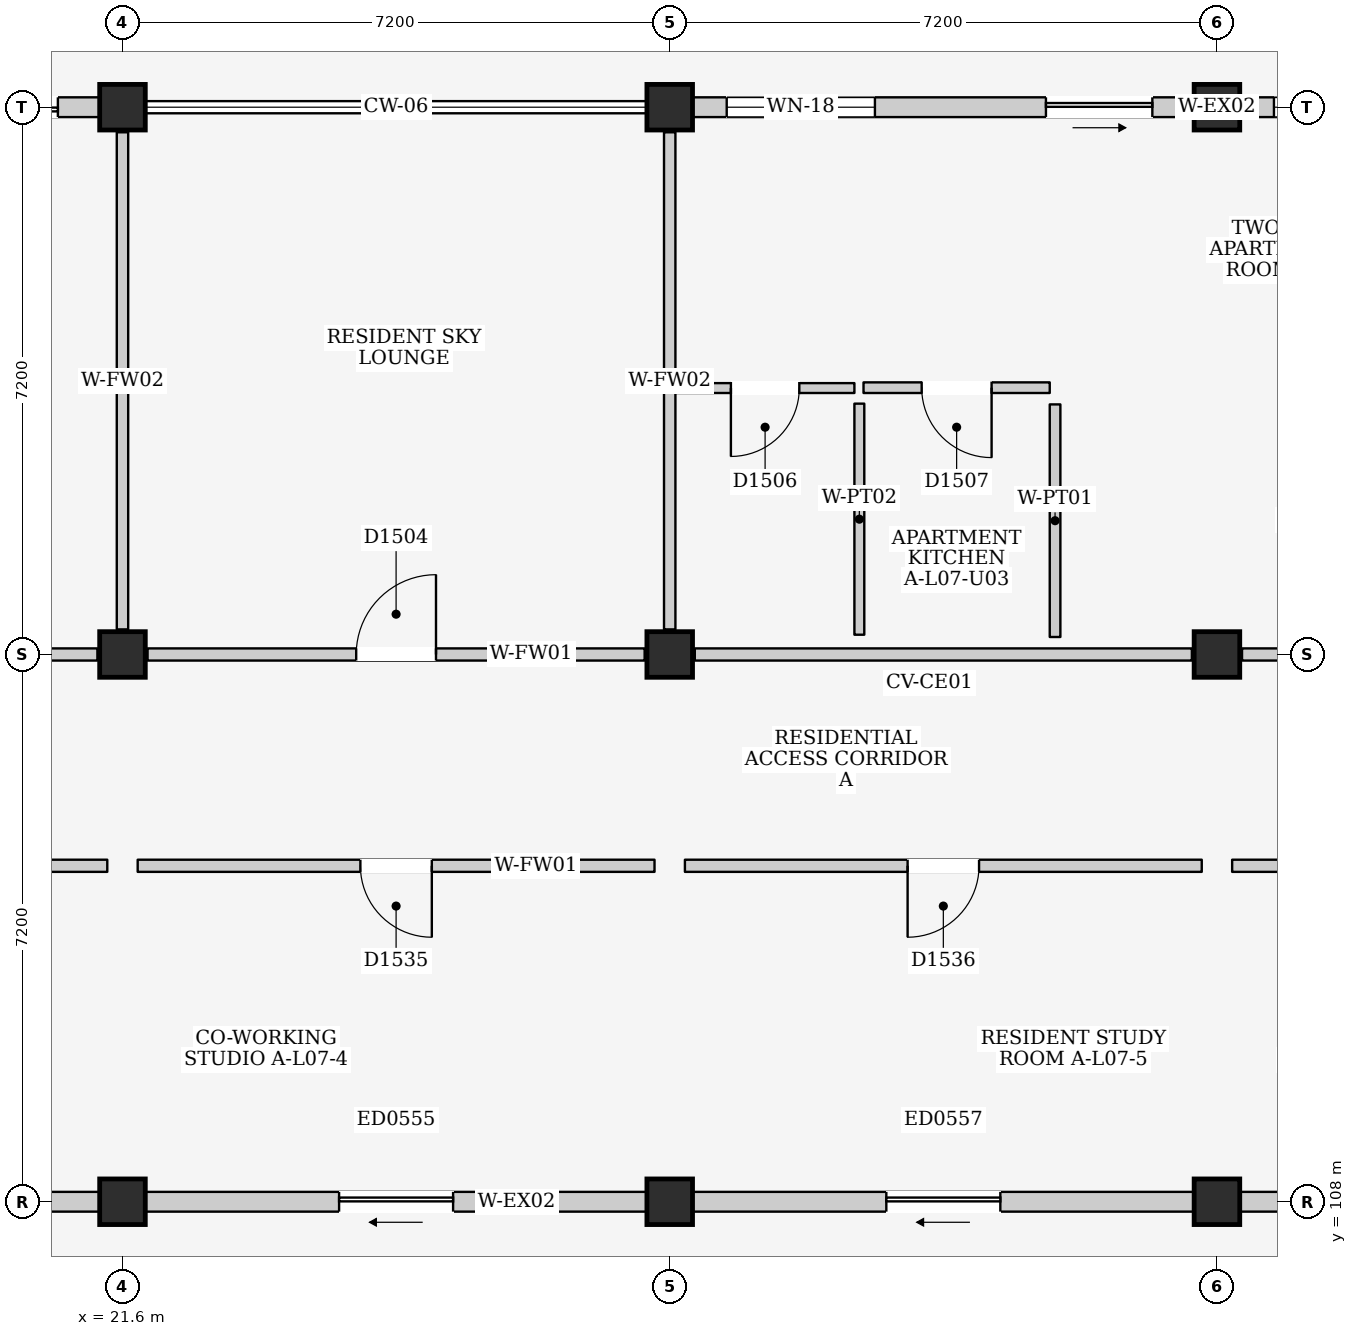
"""IFC4 building model, lengths in metres.
Left out: names, types, materials, properties, quantities, classifications, styles, units other than length and angle.
Written with IfcOpenShell. Run it as: python <this file> out.ifc"""

import sys

from ifc_helpers import new_model, si_unit, direction, frame, frame_2d, origin, origin_2d, place, context, subcontext, project, spatial, rectangle, extrude, element, fill, save


model = new_model("IFC4")
c1 = context("Model", 3, precision=1e-05, world=origin(), true_north=direction((0.0, 1.0)))
c2 = subcontext(c1, "Body", "Model", "MODEL_VIEW")
j1 = project(units=[si_unit("LENGTHUNIT", "METRE"), si_unit("PLANEANGLEUNIT", "RADIAN")], contexts=[c1])
p1 = place(None, origin())
s1 = spatial("IfcSite", under=j1, at=p1, CompositionType="ELEMENT")
p2 = place(p1, origin())
s2 = spatial("IfcBuilding", under=s1, at=p2, CompositionType="ELEMENT")
p3 = place(p2, frame((0.0, 0.0, 25.1)))
s3 = spatial("IfcBuildingStorey", under=s2, at=p3, CompositionType="ELEMENT", Elevation=25.1)
for number, where, z_axis, x_axis in (
    (1, (21.6, 108.0, 0.0), (0.0, 0.0, 1.0), (1.0, 0.0, 0.0)),
    (2, (21.6, 115.2, 0.0), (0.0, 0.0, 1.0), (1.0, 0.0, 0.0)),
    (3, (21.6, 122.4, 0.0), (0.0, 0.0, 1.0), (1.0, 0.0, 0.0)),
    (4, (28.8, 108.0, 0.0), (0.0, 0.0, 1.0), (1.0, 0.0, 0.0)),
    (5, (28.8, 115.2, 0.0), (0.0, 0.0, 1.0), (1.0, 0.0, 0.0)),
    (6, (28.8, 122.4, 0.0), (0.0, 0.0, 1.0), (1.0, 0.0, 0.0)),
    (7, (36.0, 108.0, 0.0), (0.0, 0.0, 1.0), (1.0, 0.0, 0.0)),
    (8, (36.0, 115.2, 0.0), (0.0, 0.0, 1.0), (1.0, 0.0, 0.0)),
    (9, (36.0, 122.4, 0.0), (0.0, 0.0, 1.0), (1.0, 0.0, 0.0)),
):
    element("IfcColumn", number, at=place(p3, frame(where, z_axis=z_axis, x_axis=x_axis)), inside=s3, PredefinedType="COLUMN", context=c2, shape_type="SweptSolid", body=[
        extrude(rectangle(XDim=0.6, YDim=0.6, at=origin_2d()), origin(), (0.0, 0.0, 1.0), 3.2),
    ])
p4 = place(p3, frame((14.7, 122.4, 0.0), z_axis=(0.0, 0.0, 1.0), x_axis=(1.0, 0.0, 0.0)))
e10 = element("IfcWall", 10, at=p4, inside=s3, PredefinedType="ELEMENTEDWALL", context=c2, shape_type="SweptSolid", body=[
    extrude(rectangle(XDim=6.6, YDim=0.26, at=frame_2d((3.3, 0.0))), origin(), (0.0, 0.0, 1.0), 2.525),
])
p5 = place(p4, frame((3.65, 0.0, 0.0)))
e11 = element("IfcOpeningElement", 11, at=p5, cuts=e10, PredefinedType="OPENING", context=c2, shape_type="SweptSolid", body=[
    extrude(rectangle(XDim=2.4, YDim=2.12, at=frame_2d((1.2, 1.06))), frame((0.0, 0.145, 0.0), z_axis=(0.0, -1.0, 0.0), x_axis=(1.0, 0.0, 0.0)), (0.0, 0.0, 1.0), 0.29),
])
p6 = place(p4, frame((0.45, 0.0, 0.9)))
e12 = element("IfcOpeningElement", 12, at=p6, cuts=e10, PredefinedType="OPENING", context=c2, shape_type="SweptSolid", body=[
    extrude(rectangle(XDim=1.45, YDim=1.4, at=frame_2d((0.725, 0.7))), frame((0.0, 0.145, 0.0), z_axis=(0.0, -1.0, 0.0), x_axis=(1.0, 0.0, 0.0)), (0.0, 0.0, 1.0), 0.29),
])
p7 = place(p3, frame((14.7, 108.0, 0.0), z_axis=(0.0, 0.0, 1.0), x_axis=(1.0, 0.0, 0.0)))
e13 = element("IfcWall", 13, at=p7, inside=s3, PredefinedType="ELEMENTEDWALL", context=c2, shape_type="SweptSolid", body=[
    extrude(rectangle(XDim=6.6, YDim=0.26, at=frame_2d((3.3, 0.0))), origin(), (0.0, 0.0, 1.0), 2.325),
])
p8 = place(p7, frame((2.55, 0.0, 0.0)))
e14 = element("IfcOpeningElement", 14, at=p8, cuts=e13, PredefinedType="OPENING", context=c2, shape_type="SweptSolid", body=[
    extrude(rectangle(XDim=1.5, YDim=2.12, at=frame_2d((0.75, 1.06))), frame((0.0, 0.145, 0.0), z_axis=(0.0, -1.0, 0.0), x_axis=(1.0, 0.0, 0.0)), (0.0, 0.0, 1.0), 0.29),
])
p9 = place(p3, frame((21.9, 108.0, 0.0), z_axis=(0.0, 0.0, 1.0), x_axis=(1.0, 0.0, 0.0)))
e15 = element("IfcWall", 15, at=p9, inside=s3, PredefinedType="ELEMENTEDWALL", context=c2, shape_type="SweptSolid", body=[
    extrude(rectangle(XDim=6.6, YDim=0.26, at=frame_2d((3.3, 0.0))), origin(), (0.0, 0.0, 1.0), 2.325),
])
p10 = place(p9, frame((2.55, 0.0, 0.0)))
e16 = element("IfcOpeningElement", 16, at=p10, cuts=e15, PredefinedType="OPENING", context=c2, shape_type="SweptSolid", body=[
    extrude(rectangle(XDim=1.5, YDim=2.12, at=frame_2d((0.75, 1.06))), frame((0.0, 0.145, 0.0), z_axis=(0.0, -1.0, 0.0), x_axis=(1.0, 0.0, 0.0)), (0.0, 0.0, 1.0), 0.29),
])
p11 = place(p3, frame((29.1, 122.4, 0.0), z_axis=(0.0, 0.0, 1.0), x_axis=(1.0, 0.0, 0.0)))
e17 = element("IfcWall", 17, at=p11, inside=s3, PredefinedType="ELEMENTEDWALL", context=c2, shape_type="SweptSolid", body=[
    extrude(rectangle(XDim=6.6, YDim=0.26, at=frame_2d((3.3, 0.0))), origin(), (0.0, 0.0, 1.0), 2.525),
])
p12 = place(p11, frame((4.65, 0.0, 0.0)))
e18 = element("IfcOpeningElement", 18, at=p12, cuts=e17, PredefinedType="OPENING", context=c2, shape_type="SweptSolid", body=[
    extrude(rectangle(XDim=1.4, YDim=2.1, at=frame_2d((0.7, 1.05))), frame((0.0, 0.145, 0.0), z_axis=(0.0, -1.0, 0.0), x_axis=(1.0, 0.0, 0.0)), (0.0, 0.0, 1.0), 0.29),
])
p13 = place(p11, frame((0.45, 0.0, 0.865)))
e19 = element("IfcOpeningElement", 19, at=p13, cuts=e17, PredefinedType="OPENING", context=c2, shape_type="SweptSolid", body=[
    extrude(rectangle(XDim=1.95, YDim=1.55, at=frame_2d((0.975, 0.775))), frame((0.0, 0.145, 0.0), z_axis=(0.0, -1.0, 0.0), x_axis=(1.0, 0.0, 0.0)), (0.0, 0.0, 1.0), 0.29),
])
p14 = place(p3, frame((29.1, 108.0, 0.0), z_axis=(0.0, 0.0, 1.0), x_axis=(1.0, 0.0, 0.0)))
e20 = element("IfcWall", 20, at=p14, inside=s3, PredefinedType="ELEMENTEDWALL", context=c2, shape_type="SweptSolid", body=[
    extrude(rectangle(XDim=6.6, YDim=0.26, at=frame_2d((3.3, 0.0))), origin(), (0.0, 0.0, 1.0), 2.325),
])
p15 = place(p14, frame((2.55, 0.0, 0.0)))
e21 = element("IfcOpeningElement", 21, at=p15, cuts=e20, PredefinedType="OPENING", context=c2, shape_type="SweptSolid", body=[
    extrude(rectangle(XDim=1.5, YDim=2.12, at=frame_2d((0.75, 1.06))), frame((0.0, 0.145, 0.0), z_axis=(0.0, -1.0, 0.0), x_axis=(1.0, 0.0, 0.0)), (0.0, 0.0, 1.0), 0.29),
])
p16 = place(p3, frame((36.3, 122.4, 0.0), z_axis=(0.0, 0.0, 1.0), x_axis=(1.0, 0.0, 0.0)))
e22 = element("IfcWall", 22, at=p16, inside=s3, PredefinedType="ELEMENTEDWALL", context=c2, shape_type="SweptSolid", body=[
    extrude(rectangle(XDim=6.6, YDim=0.26, at=frame_2d((3.3, 0.0))), origin(), (0.0, 0.0, 1.0), 2.525),
])
p17 = place(p16, frame((4.25, 0.0, 0.0)))
e23 = element("IfcOpeningElement", 23, at=p17, cuts=e22, PredefinedType="OPENING", context=c2, shape_type="SweptSolid", body=[
    extrude(rectangle(XDim=1.8, YDim=2.12, at=frame_2d((0.9, 1.06))), frame((0.0, 0.145, 0.0), z_axis=(0.0, -1.0, 0.0), x_axis=(1.0, 0.0, 0.0)), (0.0, 0.0, 1.0), 0.29),
])
p18 = place(p16, frame((0.45, 0.0, 0.9)))
e24 = element("IfcOpeningElement", 24, at=p18, cuts=e22, PredefinedType="OPENING", context=c2, shape_type="SweptSolid", body=[
    extrude(rectangle(XDim=1.65, YDim=1.35, at=frame_2d((0.825, 0.675))), frame((0.0, 0.145, 0.0), z_axis=(0.0, -1.0, 0.0), x_axis=(1.0, 0.0, 0.0)), (0.0, 0.0, 1.0), 0.29),
])
p19 = place(p3, frame((36.3, 108.0, 0.0), z_axis=(0.0, 0.0, 1.0), x_axis=(1.0, 0.0, 0.0)))
e25 = element("IfcWall", 25, at=p19, inside=s3, PredefinedType="ELEMENTEDWALL", context=c2, shape_type="SweptSolid", body=[
    extrude(rectangle(XDim=6.6, YDim=0.26, at=frame_2d((3.3, 0.0))), origin(), (0.0, 0.0, 1.0), 2.325),
])
p20 = place(p19, frame((2.55, 0.0, 0.0)))
e26 = element("IfcOpeningElement", 26, at=p20, cuts=e25, PredefinedType="OPENING", context=c2, shape_type="SweptSolid", body=[
    extrude(rectangle(XDim=1.5, YDim=2.12, at=frame_2d((0.75, 1.06))), frame((0.0, 0.145, 0.0), z_axis=(0.0, -1.0, 0.0), x_axis=(1.0, 0.0, 0.0)), (0.0, 0.0, 1.0), 0.29),
])
p21 = place(p3, frame((14.73, 115.2, 0.0), z_axis=(0.0, 0.0, 1.0), x_axis=(1.0, 0.0, 0.0)))
e27 = element("IfcWall", 27, at=p21, inside=s3, PredefinedType="PARTITIONING", context=c2, shape_type="SweptSolid", body=[
    extrude(rectangle(XDim=6.54, YDim=0.16, at=frame_2d((3.27, 0.0))), origin(), (0.0, 0.0, 1.0), 2.325),
])
p22 = place(p21, frame((2.77, 0.0, 0.0)))
e28 = element("IfcOpeningElement", 28, at=p22, cuts=e27, PredefinedType="OPENING", context=c2, shape_type="SweptSolid", body=[
    extrude(rectangle(XDim=1.0, YDim=2.15, at=frame_2d((0.5, 1.075))), frame((0.0, 0.095, 0.0), z_axis=(0.0, -1.0, 0.0), x_axis=(1.0, 0.0, 0.0)), (0.0, 0.0, 1.0), 0.19),
])
p23 = place(p3, frame((21.6, 115.53, 0.0), z_axis=(0.0, 0.0, 1.0), x_axis=(0.0, 1.0, 0.0)))
e29 = element("IfcWall", 29, at=p23, inside=s3, PredefinedType="PARTITIONING", context=c2, shape_type="SweptSolid", body=[
    extrude(rectangle(XDim=6.54, YDim=0.15, at=frame_2d((3.27, 0.0))), origin(), (0.0, 0.0, 1.0), 2.475),
])
p24 = place(p3, frame((21.93, 115.2, 0.0), z_axis=(0.0, 0.0, 1.0), x_axis=(1.0, 0.0, 0.0)))
e30 = element("IfcWall", 30, at=p24, inside=s3, PredefinedType="PARTITIONING", context=c2, shape_type="SweptSolid", body=[
    extrude(rectangle(XDim=6.54, YDim=0.16, at=frame_2d((3.27, 0.0))), origin(), (0.0, 0.0, 1.0), 2.325),
])
p25 = place(p24, frame((2.745, 0.0, 0.0)))
e31 = element("IfcOpeningElement", 31, at=p25, cuts=e30, PredefinedType="OPENING", context=c2, shape_type="SweptSolid", body=[
    extrude(rectangle(XDim=1.05, YDim=2.2, at=frame_2d((0.525, 1.1))), frame((0.0, 0.095, 0.0), z_axis=(0.0, -1.0, 0.0), x_axis=(1.0, 0.0, 0.0)), (0.0, 0.0, 1.0), 0.19),
])
p26 = place(p3, frame((28.8, 115.53, 0.0), z_axis=(0.0, 0.0, 1.0), x_axis=(0.0, 1.0, 0.0)))
e32 = element("IfcWall", 32, at=p26, inside=s3, PredefinedType="PARTITIONING", context=c2, shape_type="SweptSolid", body=[
    extrude(rectangle(XDim=6.54, YDim=0.15, at=frame_2d((3.27, 0.0))), origin(), (0.0, 0.0, 1.0), 2.475),
])
p27 = place(p3, frame((29.13, 115.2, 0.0), z_axis=(0.0, 0.0, 1.0), x_axis=(1.0, 0.0, 0.0)))
e33 = element("IfcWall", 33, at=p27, inside=s3, PredefinedType="PARTITIONING", context=c2, shape_type="SweptSolid", body=[
    extrude(rectangle(XDim=6.54, YDim=0.16, at=frame_2d((3.27, 0.0))), origin(), (0.0, 0.0, 1.0), 2.325),
])
p28 = place(p3, frame((36.33, 115.2, 0.0), z_axis=(0.0, 0.0, 1.0), x_axis=(1.0, 0.0, 0.0)))
e34 = element("IfcWall", 34, at=p28, inside=s3, PredefinedType="PARTITIONING", context=c2, shape_type="SweptSolid", body=[
    extrude(rectangle(XDim=6.54, YDim=0.16, at=frame_2d((3.27, 0.0))), origin(), (0.0, 0.0, 1.0), 2.325),
])
p29 = place(p28, frame((2.77, 0.0, 0.0)))
e35 = element("IfcOpeningElement", 35, at=p29, cuts=e34, PredefinedType="OPENING", context=c2, shape_type="SweptSolid", body=[
    extrude(rectangle(XDim=1.0, YDim=2.15, at=frame_2d((0.5, 1.075))), frame((0.0, 0.095, 0.0), z_axis=(0.0, -1.0, 0.0), x_axis=(1.0, 0.0, 0.0)), (0.0, 0.0, 1.0), 0.19),
])
p30 = place(p3, frame((28.88, 118.705, 0.0), z_axis=(0.0, 0.0, 1.0), x_axis=(1.0, 0.0, 0.0)))
e36 = element("IfcWall", 36, at=p30, inside=s3, PredefinedType="PARTITIONING", context=c2, shape_type="SweptSolid", body=[
    extrude(rectangle(XDim=2.35, YDim=0.13, at=frame_2d((1.175, 0.0))), origin(), (0.0, 0.0, 1.0), 2.99),
])
p31 = place(p30, frame((0.725, 0.0, 0.0)))
e37 = element("IfcOpeningElement", 37, at=p31, cuts=e36, PredefinedType="OPENING", context=c2, shape_type="SweptSolid", body=[
    extrude(rectangle(XDim=0.9, YDim=2.1, at=frame_2d((0.45, 1.05))), frame((0.0, 0.08, 0.0), z_axis=(0.0, -1.0, 0.0), x_axis=(1.0, 0.0, 0.0)), (0.0, 0.0, 1.0), 0.16),
])
p32 = place(p3, frame((31.295, 115.46, 0.0), z_axis=(0.0, 0.0, 1.0), x_axis=(0.0, 1.0, 0.0)))
e38 = element("IfcWall", 38, at=p32, inside=s3, PredefinedType="PARTITIONING", context=c2, shape_type="SweptSolid", body=[
    extrude(rectangle(XDim=3.04, YDim=0.13, at=frame_2d((1.52, 0.0))), origin(), (0.0, 0.0, 1.0), 2.99),
])
p33 = place(p3, frame((31.35, 118.71, 0.0), z_axis=(0.0, 0.0, 1.0), x_axis=(1.0, 0.0, 0.0)))
e39 = element("IfcWall", 39, at=p33, inside=s3, PredefinedType="PARTITIONING", context=c2, shape_type="SweptSolid", body=[
    extrude(rectangle(XDim=2.45, YDim=0.14, at=frame_2d((1.225, 0.0))), origin(), (0.0, 0.0, 1.0), 2.99),
])
p34 = place(p33, frame((0.765, 0.0, 0.0)))
e40 = element("IfcOpeningElement", 40, at=p34, cuts=e39, PredefinedType="OPENING", context=c2, shape_type="SweptSolid", body=[
    extrude(rectangle(XDim=0.92, YDim=2.1, at=frame_2d((0.46, 1.05))), frame((0.0, 0.085, 0.0), z_axis=(0.0, -1.0, 0.0), x_axis=(1.0, 0.0, 0.0)), (0.0, 0.0, 1.0), 0.17),
])
p35 = place(p3, frame((33.87, 115.43, 0.0), z_axis=(0.0, 0.0, 1.0), x_axis=(0.0, 1.0, 0.0)))
e41 = element("IfcWall", 41, at=p35, inside=s3, PredefinedType="PARTITIONING", context=c2, shape_type="SweptSolid", body=[
    extrude(rectangle(XDim=3.06, YDim=0.14, at=frame_2d((1.53, 0.0))), origin(), (0.0, 0.0, 1.0), 2.99),
])
p36 = place(p3, frame((14.6, 112.42, 0.0), z_axis=(0.0, 0.0, 1.0), x_axis=(1.0, 0.0, 0.0)))
e42 = element("IfcWall", 42, at=p36, inside=s3, PredefinedType="PARTITIONING", context=c2, shape_type="SweptSolid", body=[
    extrude(rectangle(XDim=6.8, YDim=0.16, at=frame_2d((3.4, 0.0))), origin(), (0.0, 0.0, 1.0), 2.99),
])
p37 = place(p36, frame((2.93, 0.0, 0.0)))
e43 = element("IfcOpeningElement", 43, at=p37, cuts=e42, PredefinedType="OPENING", context=c2, shape_type="SweptSolid", body=[
    extrude(rectangle(XDim=0.94, YDim=2.12, at=frame_2d((0.47, 1.06))), frame((0.0, 0.095, 0.0), z_axis=(0.0, -1.0, 0.0), x_axis=(1.0, 0.0, 0.0)), (0.0, 0.0, 1.0), 0.19),
])
p38 = place(p3, frame((21.8, 112.42, 0.0), z_axis=(0.0, 0.0, 1.0), x_axis=(1.0, 0.0, 0.0)))
e44 = element("IfcWall", 44, at=p38, inside=s3, PredefinedType="PARTITIONING", context=c2, shape_type="SweptSolid", body=[
    extrude(rectangle(XDim=6.8, YDim=0.16, at=frame_2d((3.4, 0.0))), origin(), (0.0, 0.0, 1.0), 2.99),
])
p39 = place(p38, frame((2.93, 0.0, 0.0)))
e45 = element("IfcOpeningElement", 45, at=p39, cuts=e44, PredefinedType="OPENING", context=c2, shape_type="SweptSolid", body=[
    extrude(rectangle(XDim=0.94, YDim=2.12, at=frame_2d((0.47, 1.06))), frame((0.0, 0.095, 0.0), z_axis=(0.0, -1.0, 0.0), x_axis=(1.0, 0.0, 0.0)), (0.0, 0.0, 1.0), 0.19),
])
p40 = place(p3, frame((29.0, 112.42, 0.0), z_axis=(0.0, 0.0, 1.0), x_axis=(1.0, 0.0, 0.0)))
e46 = element("IfcWall", 46, at=p40, inside=s3, PredefinedType="PARTITIONING", context=c2, shape_type="SweptSolid", body=[
    extrude(rectangle(XDim=6.8, YDim=0.16, at=frame_2d((3.4, 0.0))), origin(), (0.0, 0.0, 1.0), 2.99),
])
p41 = place(p40, frame((2.93, 0.0, 0.0)))
e47 = element("IfcOpeningElement", 47, at=p41, cuts=e46, PredefinedType="OPENING", context=c2, shape_type="SweptSolid", body=[
    extrude(rectangle(XDim=0.94, YDim=2.12, at=frame_2d((0.47, 1.06))), frame((0.0, 0.095, 0.0), z_axis=(0.0, -1.0, 0.0), x_axis=(1.0, 0.0, 0.0)), (0.0, 0.0, 1.0), 0.19),
])
p42 = place(p3, frame((36.2, 112.42, 0.0), z_axis=(0.0, 0.0, 1.0), x_axis=(1.0, 0.0, 0.0)))
e48 = element("IfcWall", 48, at=p42, inside=s3, PredefinedType="PARTITIONING", context=c2, shape_type="SweptSolid", body=[
    extrude(rectangle(XDim=6.8, YDim=0.16, at=frame_2d((3.4, 0.0))), origin(), (0.0, 0.0, 1.0), 2.99),
])
p43 = place(p42, frame((2.93, 0.0, 0.0)))
e49 = element("IfcOpeningElement", 49, at=p43, cuts=e48, PredefinedType="OPENING", context=c2, shape_type="SweptSolid", body=[
    extrude(rectangle(XDim=0.94, YDim=2.12, at=frame_2d((0.47, 1.06))), frame((0.0, 0.095, 0.0), z_axis=(0.0, -1.0, 0.0), x_axis=(1.0, 0.0, 0.0)), (0.0, 0.0, 1.0), 0.19),
])
p44 = place(p5, frame((2.4, 0.0, 0.0), z_axis=(0.0, 0.0, 1.0), x_axis=(-1.0, 0.0, 0.0)))
e50 = element("IfcDoor", 50, at=p44, inside=s3, OperationType="DOUBLE_DOOR_SLIDING", PredefinedType="DOOR", context=c2, shape_type="SweptSolid", body=[
    extrude(rectangle(XDim=2.4, YDim=2.12, at=frame_2d((1.2, 1.06))), frame((0.0, 0.025, 0.0), z_axis=(0.0, -1.0, 0.0), x_axis=(1.0, 0.0, 0.0)), (0.0, 0.0, 1.0), 0.05),
])
fill(e11, e50)
p45 = place(p10, frame((1.5, 0.0, 0.0), z_axis=(0.0, 0.0, 1.0), x_axis=(-1.0, 0.0, 0.0)))
e51 = element("IfcDoor", 51, at=p45, inside=s3, OperationType="SLIDING_TO_LEFT", PredefinedType="DOOR", context=c2, shape_type="SweptSolid", body=[
    extrude(rectangle(XDim=1.5, YDim=2.12, at=frame_2d((0.75, 1.06))), frame((0.0, 0.025, 0.0), z_axis=(0.0, -1.0, 0.0), x_axis=(1.0, 0.0, 0.0)), (0.0, 0.0, 1.0), 0.05),
])
fill(e16, e51)
p46 = place(p12, frame((1.4, 0.0, 0.0), z_axis=(0.0, 0.0, 1.0), x_axis=(-1.0, 0.0, 0.0)))
e52 = element("IfcDoor", 52, at=p46, inside=s3, OperationType="SLIDING_TO_RIGHT", PredefinedType="DOOR", context=c2, shape_type="SweptSolid", body=[
    extrude(rectangle(XDim=1.4, YDim=2.1, at=frame_2d((0.7, 1.05))), frame((0.0, 0.025, 0.0), z_axis=(0.0, -1.0, 0.0), x_axis=(1.0, 0.0, 0.0)), (0.0, 0.0, 1.0), 0.05),
])
fill(e18, e52)
p47 = place(p13, origin())
e53 = element("IfcWindow", 53, at=p47, inside=s3, PartitioningType="DOUBLE_PANEL_VERTICAL", PredefinedType="WINDOW", context=c2, shape_type="SweptSolid", body=[
    extrude(rectangle(XDim=1.95, YDim=1.55, at=frame_2d((0.975, 0.775))), frame((0.0, 0.03, 0.0), z_axis=(0.0, -1.0, 0.0), x_axis=(1.0, 0.0, 0.0)), (0.0, 0.0, 1.0), 0.06),
])
fill(e19, e53)
p48 = place(p15, frame((1.5, 0.0, 0.0), z_axis=(0.0, 0.0, 1.0), x_axis=(-1.0, 0.0, 0.0)))
e54 = element("IfcDoor", 54, at=p48, inside=s3, OperationType="SLIDING_TO_LEFT", PredefinedType="DOOR", context=c2, shape_type="SweptSolid", body=[
    extrude(rectangle(XDim=1.5, YDim=2.12, at=frame_2d((0.75, 1.06))), frame((0.0, 0.025, 0.0), z_axis=(0.0, -1.0, 0.0), x_axis=(1.0, 0.0, 0.0)), (0.0, 0.0, 1.0), 0.05),
])
fill(e21, e54)
p49 = place(p18, origin())
e55 = element("IfcWindow", 55, at=p49, inside=s3, PartitioningType="DOUBLE_PANEL_VERTICAL", PredefinedType="WINDOW", context=c2, shape_type="SweptSolid", body=[
    extrude(rectangle(XDim=1.65, YDim=1.35, at=frame_2d((0.825, 0.675))), frame((0.0, 0.03, 0.0), z_axis=(0.0, -1.0, 0.0), x_axis=(1.0, 0.0, 0.0)), (0.0, 0.0, 1.0), 0.06),
])
fill(e24, e55)
p50 = place(p25, origin())
e56 = element("IfcDoor", 56, at=p50, inside=s3, OperationType="SINGLE_SWING_RIGHT", PredefinedType="DOOR", context=c2, shape_type="SweptSolid", body=[
    extrude(rectangle(XDim=1.05, YDim=2.2, at=frame_2d((0.525, 1.1))), frame((0.0, 0.025, 0.0), z_axis=(0.0, -1.0, 0.0), x_axis=(1.0, 0.0, 0.0)), (0.0, 0.0, 1.0), 0.05),
])
fill(e31, e56)
p51 = place(p31, frame((0.9, 0.0, 0.0), z_axis=(0.0, 0.0, 1.0), x_axis=(-1.0, 0.0, 0.0)))
e57 = element("IfcDoor", 57, at=p51, inside=s3, OperationType="SINGLE_SWING_RIGHT", PredefinedType="DOOR", context=c2, shape_type="SweptSolid", body=[
    extrude(rectangle(XDim=0.9, YDim=2.1, at=frame_2d((0.45, 1.05))), frame((0.0, 0.025, 0.0), z_axis=(0.0, -1.0, 0.0), x_axis=(1.0, 0.0, 0.0)), (0.0, 0.0, 1.0), 0.05),
])
fill(e37, e57)
p52 = place(p34, frame((0.92, 0.0, 0.0), z_axis=(0.0, 0.0, 1.0), x_axis=(-1.0, 0.0, 0.0)))
e58 = element("IfcDoor", 58, at=p52, inside=s3, OperationType="SINGLE_SWING_LEFT", PredefinedType="DOOR", context=c2, shape_type="SweptSolid", body=[
    extrude(rectangle(XDim=0.92, YDim=2.1, at=frame_2d((0.46, 1.05))), frame((0.0, 0.025, 0.0), z_axis=(0.0, -1.0, 0.0), x_axis=(1.0, 0.0, 0.0)), (0.0, 0.0, 1.0), 0.05),
])
fill(e40, e58)
p53 = place(p39, frame((0.94, 0.0, 0.0), z_axis=(0.0, 0.0, 1.0), x_axis=(-1.0, 0.0, 0.0)))
e59 = element("IfcDoor", 59, at=p53, inside=s3, OperationType="SINGLE_SWING_LEFT", PredefinedType="DOOR", context=c2, shape_type="SweptSolid", body=[
    extrude(rectangle(XDim=0.94, YDim=2.12, at=frame_2d((0.47, 1.06))), frame((0.0, 0.025, 0.0), z_axis=(0.0, -1.0, 0.0), x_axis=(1.0, 0.0, 0.0)), (0.0, 0.0, 1.0), 0.05),
])
fill(e45, e59)
p54 = place(p41, frame((0.94, 0.0, 0.0), z_axis=(0.0, 0.0, 1.0), x_axis=(-1.0, 0.0, 0.0)))
e60 = element("IfcDoor", 60, at=p54, inside=s3, OperationType="SINGLE_SWING_RIGHT", PredefinedType="DOOR", context=c2, shape_type="SweptSolid", body=[
    extrude(rectangle(XDim=0.94, YDim=2.12, at=frame_2d((0.47, 1.06))), frame((0.0, 0.025, 0.0), z_axis=(0.0, -1.0, 0.0), x_axis=(1.0, 0.0, 0.0)), (0.0, 0.0, 1.0), 0.05),
])
fill(e47, e60)
save(model, sys.argv[1])
